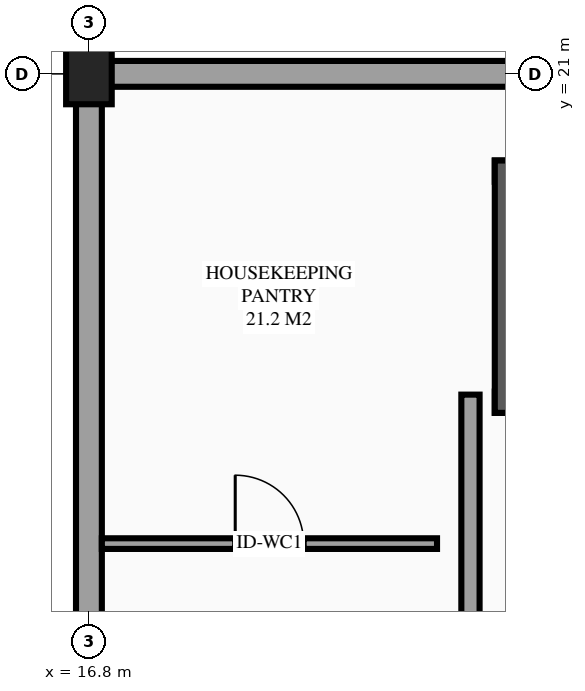
"""IFC4 building model, lengths in metres.
Left out: names, types, materials, properties, quantities, classifications, styles, units other than length and angle.
Written with IfcOpenShell. Run it as: python <this file> out.ifc"""

import sys

from ifc_helpers import new_model, si_unit, direction, frame, frame_2d, origin, origin_2d, place, context, subcontext, project, spatial, rectangle, extrude, element, fill, save


model = new_model("IFC4")
c1 = context("Model", 3, precision=1e-05, world=origin(), true_north=direction((0.0, 1.0)))
c2 = subcontext(c1, "Body", "Model", "MODEL_VIEW")
j1 = project(units=[si_unit("LENGTHUNIT", "METRE"), si_unit("PLANEANGLEUNIT", "RADIAN")], contexts=[c1])
p1 = place(None, origin())
s1 = spatial("IfcSite", under=j1, at=p1, CompositionType="ELEMENT")
p2 = place(p1, origin())
s2 = spatial("IfcBuilding", under=s1, at=p2, CompositionType="ELEMENT")
p3 = place(p2, frame((0.0, 0.0, 21.9)))
s3 = spatial("IfcBuildingStorey", under=s2, at=p3, CompositionType="ELEMENT", Elevation=21.9)
p4 = place(p3, frame((16.8, 21.0, 0.0), z_axis=(0.0, 0.0, 1.0), x_axis=(1.0, 0.0, 0.0)))
e1 = element("IfcColumn", 1, at=p4, inside=s3, PredefinedType="COLUMN", context=c2, shape_type="SweptSolid", body=[
    extrude(rectangle(XDim=0.6, YDim=0.8, at=origin_2d()), origin(), (0.0, 0.0, 1.0), 3.6),
])
p5 = place(p3, frame((25.2, 21.0, 0.0), z_axis=(0.0, 0.0, 1.0), x_axis=(-1.0, 0.0, 0.0)))
e2 = element("IfcWall", 2, at=p5, inside=s3, PredefinedType="STANDARD", context=c2, shape_type="SweptSolid", body=[
    extrude(rectangle(XDim=8.4, YDim=0.34, at=frame_2d((4.2, 0.0))), origin(), (0.0, 0.0, 1.0), 2.48),
])
p6 = place(p3, frame((16.8, 21.0, 0.0), z_axis=(0.0, 0.0, 1.0), x_axis=(0.0, -1.0, 0.0)))
e3 = element("IfcWall", 3, at=p6, inside=s3, PredefinedType="STANDARD", context=c2, shape_type="SweptSolid", body=[
    extrude(rectangle(XDim=8.4, YDim=0.34, at=frame_2d((4.2, 0.0))), origin(), (0.0, 0.0, 1.0), 2.63),
])
p7 = place(p3, frame((22.14, 16.68, 0.0), z_axis=(0.0, 0.0, 1.0), x_axis=(1.0, 0.0, 0.0)))
e4 = element("IfcWall", 4, at=p7, inside=s3, PredefinedType="SHEAR", context=c2, shape_type="SweptSolid", body=[
    extrude(rectangle(XDim=2.52, YDim=0.28, at=frame_2d((1.26, 0.0))), origin(), (0.0, 0.0, 1.0), 3.6),
])
p8 = place(p7, frame((0.71, 0.0, 0.0)))
e5 = element("IfcOpeningElement", 5, at=p8, cuts=e4, PredefinedType="OPENING", context=c2, shape_type="SweptSolid", body=[
    extrude(rectangle(XDim=1.1, YDim=2.2, at=frame_2d((0.55, 1.1))), frame((0.0, 0.15, 0.0), z_axis=(0.0, -1.0, 0.0), x_axis=(1.0, 0.0, 0.0)), (0.0, 0.0, 1.0), 0.3),
])
p9 = place(p3, frame((24.66, 19.72, 0.0), z_axis=(0.0, 0.0, 1.0), x_axis=(-1.0, 0.0, 0.0)))
e6 = element("IfcWall", 6, at=p9, inside=s3, PredefinedType="SHEAR", context=c2, shape_type="SweptSolid", body=[
    extrude(rectangle(XDim=2.52, YDim=0.28, at=frame_2d((1.26, 0.0))), origin(), (0.0, 0.0, 1.0), 3.6),
])
p10 = place(p3, frame((22.28, 19.86, 0.0), z_axis=(0.0, 0.0, 1.0), x_axis=(0.0, -1.0, 0.0)))
e7 = element("IfcWall", 7, at=p10, inside=s3, PredefinedType="SHEAR", context=c2, shape_type="SweptSolid", body=[
    extrude(rectangle(XDim=3.32, YDim=0.28, at=frame_2d((1.66, 0.0))), origin(), (0.0, 0.0, 1.0), 3.6),
])
p11 = place(p3, frame((21.82, 12.94, 0.0), z_axis=(0.0, 0.0, 1.0), x_axis=(0.0, 1.0, 0.0)))
e8 = element("IfcWall", 8, at=p11, inside=s3, PredefinedType="PARTITIONING", context=c2, shape_type="SweptSolid", body=[
    extrude(rectangle(XDim=3.84, YDim=0.24, at=frame_2d((1.92, 0.0))), origin(), (0.0, 0.0, 1.0), 3.375),
])
p12 = place(p3, frame((16.97, 14.82, 0.0), z_axis=(0.0, 0.0, 1.0), x_axis=(1.0, 0.0, 0.0)))
e9 = element("IfcWall", 9, at=p12, inside=s3, PredefinedType="PARTITIONING", context=c2, shape_type="SweptSolid", body=[
    extrude(rectangle(XDim=4.41, YDim=0.14, at=frame_2d((2.205, 0.0))), origin(), (0.0, 0.0, 1.0), 3.375),
])
p13 = place(p12, frame((1.755, 0.0, 0.0)))
e10 = element("IfcOpeningElement", 10, at=p13, cuts=e9, PredefinedType="OPENING", context=c2, shape_type="SweptSolid", body=[
    extrude(rectangle(XDim=0.9, YDim=2.12, at=frame_2d((0.45, 1.06))), frame((0.0, 0.08, 0.0), z_axis=(0.0, -1.0, 0.0), x_axis=(1.0, 0.0, 0.0)), (0.0, 0.0, 1.0), 0.16),
])
p14 = place(p13, origin())
e11 = element("IfcDoor", 11, at=p14, inside=s3, OperationType="SINGLE_SWING_LEFT", PredefinedType="DOOR", context=c2, shape_type="SweptSolid", body=[
    extrude(rectangle(XDim=0.9, YDim=2.12, at=frame_2d((0.45, 1.06))), frame((0.0, 0.025, 0.0), z_axis=(0.0, -1.0, 0.0), x_axis=(1.0, 0.0, 0.0)), (0.0, 0.0, 1.0), 0.05),
])
fill(e10, e11)
save(model, sys.argv[1])
